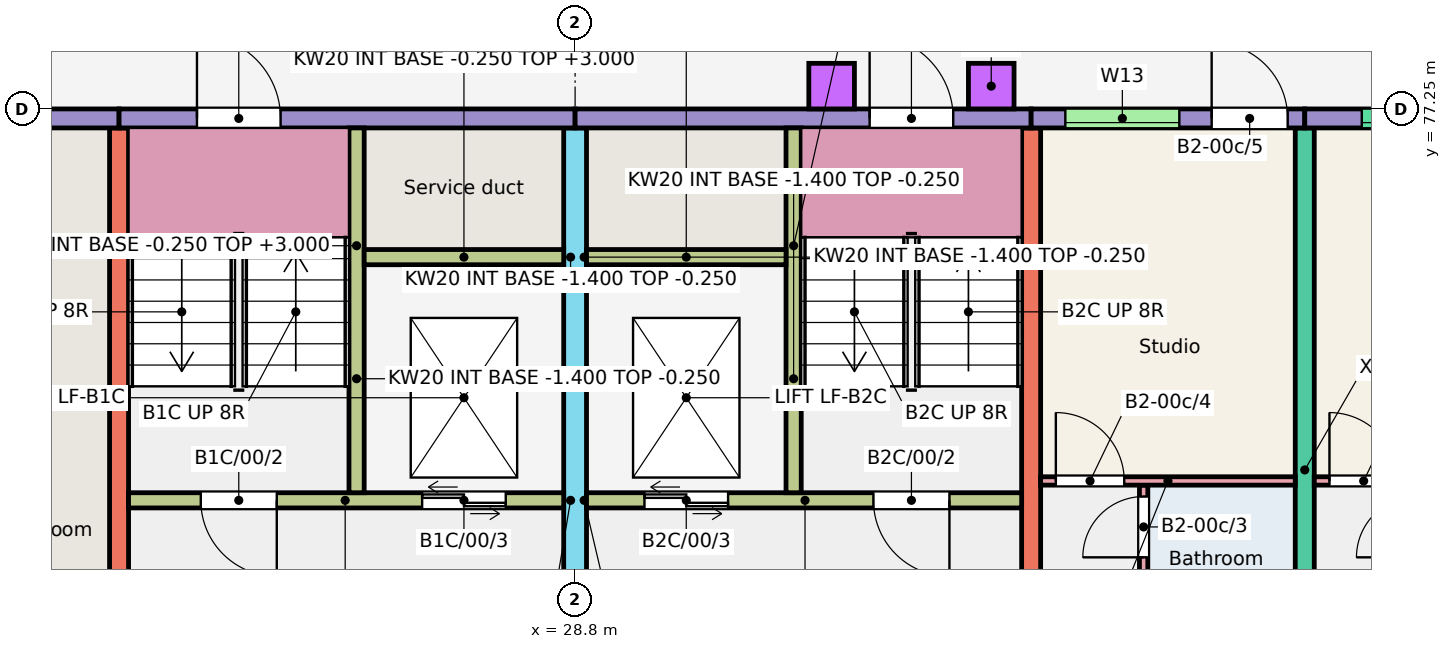
"""IFC4 building model, lengths in metres.
Left out: names, types, materials, properties, quantities, classifications, styles, units other than length and angle.
Written with IfcOpenShell. Run it as: python <this file> out.ifc"""

import sys

from ifc_helpers import new_model, si_unit, direction, frame, frame_2d, origin, origin_2d, place, context, subcontext, project, spatial, rectangle, extrude, element, fill, save


model = new_model("IFC4")
c1 = context("Model", 3, precision=1e-05, world=origin(), true_north=direction((0.0, 1.0)))
c2 = subcontext(c1, "Body", "Model", "MODEL_VIEW")
j1 = project(units=[si_unit("LENGTHUNIT", "METRE"), si_unit("PLANEANGLEUNIT", "RADIAN")], contexts=[c1])
p1 = place(None, origin())
s1 = spatial("IfcSite", under=j1, at=p1, CompositionType="ELEMENT")
p2 = place(p1, origin())
s2 = spatial("IfcBuilding", under=s1, at=p2, CompositionType="ELEMENT")
p3 = place(p2, origin())
s3 = spatial("IfcBuildingStorey", under=s2, at=p3, CompositionType="ELEMENT", Elevation=0.0)
p4 = place(p3, frame((22.8, 68.0, -0.25), z_axis=(0.0, 0.0, 1.0), x_axis=(0.0, 1.0, 0.0)))
e1 = element("IfcWall", 1, at=p4, inside=s3, PredefinedType="SHEAR", context=c2, shape_type="SweptSolid", body=[
    extrude(rectangle(XDim=9.0, YDim=0.25, at=frame_2d((4.5, 0.0))), origin(), (0.0, 0.0, 1.0), 3.25),
])
p5 = place(p3, frame((28.8, 66.0, -0.25), z_axis=(0.0, 0.0, 1.0), x_axis=(0.0, 1.0, 0.0)))
e2 = element("IfcWall", 2, at=p5, inside=s3, PredefinedType="SHEAR", context=c2, shape_type="SweptSolid", body=[
    extrude(rectangle(XDim=11.0, YDim=0.3, at=frame_2d((5.5, 0.0))), origin(), (0.0, 0.0, 1.0), 3.25),
])
p6 = place(p5, frame((0.3, 0.0, 0.25)))
e3 = element("IfcOpeningElement", 3, at=p6, cuts=e2, PredefinedType="OPENING", context=c2, shape_type="SweptSolid", body=[
    extrude(rectangle(XDim=1.2, YDim=2.1, at=frame_2d((0.6, 1.05))), frame((0.0, 0.16, 0.0), z_axis=(0.0, -1.0, 0.0), x_axis=(1.0, 0.0, 0.0)), (0.0, 0.0, 1.0), 0.32),
])
for number, where, z_axis, x_axis in (
    (4, (34.8, 68.0, -0.25), (0.0, 0.0, 1.0), (0.0, 1.0, 0.0)),
    (5, (38.4, 68.0, -0.25), (0.0, 0.0, 1.0), (0.0, 1.0, 0.0)),
):
    element("IfcWall", number, at=place(p3, frame(where, z_axis=z_axis, x_axis=x_axis)), inside=s3, PredefinedType="SHEAR", context=c2, shape_type="SweptSolid", body=[
        extrude(rectangle(XDim=9.0, YDim=0.25, at=frame_2d((4.5, 0.0))), origin(), (0.0, 0.0, 1.0), 3.25),
    ])
p7 = place(p3, frame((19.2, 77.125, -0.25), z_axis=(0.0, 0.0, 1.0), x_axis=(1.0, 0.0, 0.0)))
e6 = element("IfcWall", 6, at=p7, inside=s3, PredefinedType="SOLIDWALL", context=c2, shape_type="SweptSolid", body=[
    extrude(rectangle(XDim=3.6, YDim=0.25, at=frame_2d((1.8, 0.0))), origin(), (0.0, 0.0, 1.0), 3.25),
])
p8 = place(p7, frame((1.288, 0.0, 0.25)))
e7 = element("IfcOpeningElement", 7, at=p8, cuts=e6, PredefinedType="OPENING", context=c2, shape_type="SweptSolid", body=[
    extrude(rectangle(XDim=1.0, YDim=2.1, at=frame_2d((0.5, 1.05))), frame((0.0, 0.135, 0.0), z_axis=(0.0, -1.0, 0.0), x_axis=(1.0, 0.0, 0.0)), (0.0, 0.0, 1.0), 0.27),
])
p9 = place(p3, frame((22.8, 77.125, -0.25), z_axis=(0.0, 0.0, 1.0), x_axis=(1.0, 0.0, 0.0)))
e8 = element("IfcWall", 8, at=p9, inside=s3, PredefinedType="SOLIDWALL", context=c2, shape_type="SweptSolid", body=[
    extrude(rectangle(XDim=6.0, YDim=0.25, at=frame_2d((3.0, 0.0))), origin(), (0.0, 0.0, 1.0), 3.25),
])
p10 = place(p9, frame((1.025, 0.0, 0.25)))
e9 = element("IfcOpeningElement", 9, at=p10, cuts=e8, PredefinedType="OPENING", context=c2, shape_type="SweptSolid", body=[
    extrude(rectangle(XDim=1.1, YDim=2.1, at=frame_2d((0.55, 1.05))), frame((0.0, 0.135, 0.0), z_axis=(0.0, -1.0, 0.0), x_axis=(1.0, 0.0, 0.0)), (0.0, 0.0, 1.0), 0.27),
])
p11 = place(p3, frame((22.925, 72.1, -0.25), z_axis=(0.0, 0.0, 1.0), x_axis=(1.0, 0.0, 0.0)))
e10 = element("IfcWall", 10, at=p11, inside=s3, PredefinedType="SHEAR", context=c2, shape_type="SweptSolid", body=[
    extrude(rectangle(XDim=5.725, YDim=0.2, at=frame_2d((2.862, 0.0))), origin(), (0.0, 0.0, 1.0), 3.25),
])
p12 = place(p11, frame((0.95, 0.0, 0.25)))
e11 = element("IfcOpeningElement", 11, at=p12, cuts=e10, PredefinedType="OPENING", context=c2, shape_type="SweptSolid", body=[
    extrude(rectangle(XDim=1.0, YDim=2.1, at=frame_2d((0.5, 1.05))), frame((0.0, 0.11, 0.0), z_axis=(0.0, -1.0, 0.0), x_axis=(1.0, 0.0, 0.0)), (0.0, 0.0, 1.0), 0.22),
])
p13 = place(p11, frame((3.863, 0.0, 0.25)))
e12 = element("IfcOpeningElement", 12, at=p13, cuts=e10, PredefinedType="OPENING", context=c2, shape_type="SweptSolid", body=[
    extrude(rectangle(XDim=1.1, YDim=2.1, at=frame_2d((0.55, 1.05))), frame((0.0, 0.11, 0.0), z_axis=(0.0, -1.0, 0.0), x_axis=(1.0, 0.0, 0.0)), (0.0, 0.0, 1.0), 0.22),
])
p14 = place(p3, frame((25.925, 72.2, -0.25), z_axis=(0.0, 0.0, 1.0), x_axis=(0.0, 1.0, 0.0)))
e13 = element("IfcWall", 13, at=p14, inside=s3, PredefinedType="SHEAR", context=c2, shape_type="SweptSolid", body=[
    extrude(rectangle(XDim=4.8, YDim=0.2, at=frame_2d((2.4, 0.0))), origin(), (0.0, 0.0, 1.0), 3.25),
])
p15 = place(p3, frame((26.025, 75.3, -0.25), z_axis=(0.0, 0.0, 1.0), x_axis=(1.0, 0.0, 0.0)))
e14 = element("IfcWall", 14, at=p15, inside=s3, PredefinedType="SHEAR", context=c2, shape_type="SweptSolid", body=[
    extrude(rectangle(XDim=2.625, YDim=0.2, at=frame_2d((1.312, 0.0))), origin(), (0.0, 0.0, 1.0), 3.25),
])
p16 = place(p3, frame((28.8, 77.125, -0.25), z_axis=(0.0, 0.0, 1.0), x_axis=(1.0, 0.0, 0.0)))
e15 = element("IfcWall", 15, at=p16, inside=s3, PredefinedType="SOLIDWALL", context=c2, shape_type="SweptSolid", body=[
    extrude(rectangle(XDim=6.0, YDim=0.25, at=frame_2d((3.0, 0.0))), origin(), (0.0, 0.0, 1.0), 3.25),
])
p17 = place(p16, frame((3.875, 0.0, 0.25)))
e16 = element("IfcOpeningElement", 16, at=p17, cuts=e15, PredefinedType="OPENING", context=c2, shape_type="SweptSolid", body=[
    extrude(rectangle(XDim=1.1, YDim=2.1, at=frame_2d((0.55, 1.05))), frame((0.0, 0.135, 0.0), z_axis=(0.0, -1.0, 0.0), x_axis=(1.0, 0.0, 0.0)), (0.0, 0.0, 1.0), 0.27),
])
p18 = place(p3, frame((28.95, 72.1, -0.25), z_axis=(0.0, 0.0, 1.0), x_axis=(1.0, 0.0, 0.0)))
e17 = element("IfcWall", 17, at=p18, inside=s3, PredefinedType="SHEAR", context=c2, shape_type="SweptSolid", body=[
    extrude(rectangle(XDim=5.725, YDim=0.2, at=frame_2d((2.863, 0.0))), origin(), (0.0, 0.0, 1.0), 3.25),
])
p19 = place(p18, frame((3.775, 0.0, 0.25)))
e18 = element("IfcOpeningElement", 18, at=p19, cuts=e17, PredefinedType="OPENING", context=c2, shape_type="SweptSolid", body=[
    extrude(rectangle(XDim=1.0, YDim=2.1, at=frame_2d((0.5, 1.05))), frame((0.0, 0.11, 0.0), z_axis=(0.0, -1.0, 0.0), x_axis=(1.0, 0.0, 0.0)), (0.0, 0.0, 1.0), 0.22),
])
p20 = place(p18, frame((0.762, 0.0, 0.25)))
e19 = element("IfcOpeningElement", 19, at=p20, cuts=e17, PredefinedType="OPENING", context=c2, shape_type="SweptSolid", body=[
    extrude(rectangle(XDim=1.1, YDim=2.1, at=frame_2d((0.55, 1.05))), frame((0.0, 0.11, 0.0), z_axis=(0.0, -1.0, 0.0), x_axis=(1.0, 0.0, 0.0)), (0.0, 0.0, 1.0), 0.22),
])
p21 = place(p3, frame((31.675, 72.2, -0.25), z_axis=(0.0, 0.0, 1.0), x_axis=(0.0, 1.0, 0.0)))
e20 = element("IfcWall", 20, at=p21, inside=s3, PredefinedType="SHEAR", context=c2, shape_type="SweptSolid", body=[
    extrude(rectangle(XDim=4.8, YDim=0.2, at=frame_2d((2.4, 0.0))), origin(), (0.0, 0.0, 1.0), 3.25),
])
p22 = place(p3, frame((28.95, 75.3, -0.25), z_axis=(0.0, 0.0, 1.0), x_axis=(1.0, 0.0, 0.0)))
e21 = element("IfcWall", 21, at=p22, inside=s3, PredefinedType="SHEAR", context=c2, shape_type="SweptSolid", body=[
    extrude(rectangle(XDim=2.625, YDim=0.2, at=frame_2d((1.312, 0.0))), origin(), (0.0, 0.0, 1.0), 3.25),
])
p23 = place(p3, frame((34.8, 77.125, -0.25), z_axis=(0.0, 0.0, 1.0), x_axis=(1.0, 0.0, 0.0)))
e22 = element("IfcWall", 22, at=p23, inside=s3, PredefinedType="SOLIDWALL", context=c2, shape_type="SweptSolid", body=[
    extrude(rectangle(XDim=3.6, YDim=0.25, at=frame_2d((1.8, 0.0))), origin(), (0.0, 0.0, 1.0), 3.25),
])
p24 = place(p23, frame((0.45, 0.0, 1.45)))
e23 = element("IfcOpeningElement", 23, at=p24, cuts=e22, PredefinedType="OPENING", context=c2, shape_type="SweptSolid", body=[
    extrude(rectangle(XDim=1.5, YDim=1.2, at=frame_2d((0.75, 0.6))), frame((0.0, 0.135, 0.0), z_axis=(0.0, -1.0, 0.0), x_axis=(1.0, 0.0, 0.0)), (0.0, 0.0, 1.0), 0.27),
])
p25 = place(p23, frame((2.375, 0.0, 0.25)))
e24 = element("IfcOpeningElement", 24, at=p25, cuts=e22, PredefinedType="OPENING", context=c2, shape_type="SweptSolid", body=[
    extrude(rectangle(XDim=1.0, YDim=2.1, at=frame_2d((0.5, 1.05))), frame((0.0, 0.135, 0.0), z_axis=(0.0, -1.0, 0.0), x_axis=(1.0, 0.0, 0.0)), (0.0, 0.0, 1.0), 0.27),
])
p26 = place(p3, frame((38.4, 77.125, -0.25), z_axis=(0.0, 0.0, 1.0), x_axis=(1.0, 0.0, 0.0)))
e25 = element("IfcWall", 25, at=p26, inside=s3, PredefinedType="SOLIDWALL", context=c2, shape_type="SweptSolid", body=[
    extrude(rectangle(XDim=3.6, YDim=0.25, at=frame_2d((1.8, 0.0))), origin(), (0.0, 0.0, 1.0), 3.25),
])
p27 = place(p26, frame((0.75, 0.0, 1.45)))
e26 = element("IfcOpeningElement", 26, at=p27, cuts=e25, PredefinedType="OPENING", context=c2, shape_type="SweptSolid", body=[
    extrude(rectangle(XDim=2.1, YDim=1.2, at=frame_2d((1.05, 0.6))), frame((0.0, 0.135, 0.0), z_axis=(0.0, -1.0, 0.0), x_axis=(1.0, 0.0, 0.0)), (0.0, 0.0, 1.0), 0.27),
])
for number, where, z_axis, x_axis in (
    (27, (25.825, 72.1, -1.4), (0.0, 0.0, 1.0), (1.0, 0.0, 0.0)),
    (28, (25.825, 75.3, -1.4), (0.0, 0.0, 1.0), (1.0, 0.0, 0.0)),
):
    element("IfcWall", number, at=place(p3, frame(where, z_axis=z_axis, x_axis=x_axis)), inside=s3, PredefinedType="SHEAR", context=c2, shape_type="SweptSolid", body=[
        extrude(rectangle(XDim=2.975, YDim=0.2, at=frame_2d((1.488, 0.0))), origin(), (0.0, 0.0, 1.0), 1.15),
    ])
p28 = place(p3, frame((25.925, 72.2, -1.4), z_axis=(0.0, 0.0, 1.0), x_axis=(0.0, 1.0, 0.0)))
e29 = element("IfcWall", 29, at=p28, inside=s3, PredefinedType="SHEAR", context=c2, shape_type="SweptSolid", body=[
    extrude(rectangle(XDim=3.0, YDim=0.2, at=frame_2d((1.5, 0.0))), origin(), (0.0, 0.0, 1.0), 1.15),
])
p29 = place(p3, frame((28.725, 72.2, -1.4), z_axis=(0.0, 0.0, 1.0), x_axis=(0.0, 1.0, 0.0)))
e30 = element("IfcWall", 30, at=p29, inside=s3, PredefinedType="SHEAR", context=c2, shape_type="SweptSolid", body=[
    extrude(rectangle(XDim=3.0, YDim=0.15, at=frame_2d((1.5, 0.0))), origin(), (0.0, 0.0, 1.0), 1.15),
])
for number, where, z_axis, x_axis in (
    (31, (28.8, 72.1, -1.4), (0.0, 0.0, 1.0), (1.0, 0.0, 0.0)),
    (32, (28.8, 75.3, -1.4), (0.0, 0.0, 1.0), (1.0, 0.0, 0.0)),
):
    element("IfcWall", number, at=place(p3, frame(where, z_axis=z_axis, x_axis=x_axis)), inside=s3, PredefinedType="SHEAR", context=c2, shape_type="SweptSolid", body=[
        extrude(rectangle(XDim=2.975, YDim=0.2, at=frame_2d((1.487, 0.0))), origin(), (0.0, 0.0, 1.0), 1.15),
    ])
p30 = place(p3, frame((31.675, 72.2, -1.4), z_axis=(0.0, 0.0, 1.0), x_axis=(0.0, 1.0, 0.0)))
e33 = element("IfcWall", 33, at=p30, inside=s3, PredefinedType="SHEAR", context=c2, shape_type="SweptSolid", body=[
    extrude(rectangle(XDim=3.0, YDim=0.2, at=frame_2d((1.5, 0.0))), origin(), (0.0, 0.0, 1.0), 1.15),
])
p31 = place(p3, frame((28.875, 72.2, -1.4), z_axis=(0.0, 0.0, 1.0), x_axis=(0.0, 1.0, 0.0)))
e34 = element("IfcWall", 34, at=p31, inside=s3, PredefinedType="SHEAR", context=c2, shape_type="SweptSolid", body=[
    extrude(rectangle(XDim=3.0, YDim=0.15, at=frame_2d((1.5, 0.0))), origin(), (0.0, 0.0, 1.0), 1.15),
])
for number, where, z_axis, x_axis in (
    (35, (32.175, 77.55, -0.25), (0.0, 0.0, 1.0), (1.0, 0.0, 0.0)),
    (36, (34.275, 77.55, -0.25), (0.0, 0.0, 1.0), (1.0, 0.0, 0.0)),
):
    element("IfcColumn", number, at=place(p3, frame(where, z_axis=z_axis, x_axis=x_axis)), inside=s3, PredefinedType="COLUMN", context=c2, shape_type="SweptSolid", body=[
        extrude(rectangle(XDim=0.6, YDim=0.6, at=origin_2d()), origin(), (0.0, 0.0, 1.0), 3.15),
    ])
p32 = place(p3, frame((38.525, 72.355, 0.0), z_axis=(0.0, 0.0, 1.0), x_axis=(1.0, 0.0, 0.0)))
e37 = element("IfcWall", 37, at=p32, inside=s3, PredefinedType="PARTITIONING", context=c2, shape_type="SweptSolid", body=[
    extrude(rectangle(XDim=3.35, YDim=0.11, at=frame_2d((1.675, 0.0))), origin(), (0.0, 0.0, 1.0), 2.8),
])
p33 = place(p32, frame((0.2, 0.0, 0.0)))
e38 = element("IfcOpeningElement", 38, at=p33, cuts=e37, PredefinedType="OPENING", context=c2, shape_type="SweptSolid", body=[
    extrude(rectangle(XDim=0.9, YDim=2.1, at=frame_2d((0.45, 1.05))), frame((0.0, 0.065, 0.0), z_axis=(0.0, -1.0, 0.0), x_axis=(1.0, 0.0, 0.0)), (0.0, 0.0, 1.0), 0.13),
])
p34 = place(p3, frame((36.28, 68.0, 0.0), z_axis=(0.0, 0.0, 1.0), x_axis=(0.0, 1.0, 0.0)))
e39 = element("IfcWall", 39, at=p34, inside=s3, PredefinedType="PARTITIONING", context=c2, shape_type="SweptSolid", body=[
    extrude(rectangle(XDim=4.3, YDim=0.11, at=frame_2d((2.15, 0.0))), origin(), (0.0, 0.0, 1.0), 2.8),
])
p35 = place(p34, frame((0.2, 0.0, 0.0)))
e40 = element("IfcOpeningElement", 40, at=p35, cuts=e39, PredefinedType="OPENING", context=c2, shape_type="SweptSolid", body=[
    extrude(rectangle(XDim=0.8, YDim=2.1, at=frame_2d((0.4, 1.05))), frame((0.0, 0.065, 0.0), z_axis=(0.0, -1.0, 0.0), x_axis=(1.0, 0.0, 0.0)), (0.0, 0.0, 1.0), 0.13),
])
p36 = place(p34, frame((3.35, 0.0, 0.0)))
e41 = element("IfcOpeningElement", 41, at=p36, cuts=e39, PredefinedType="OPENING", context=c2, shape_type="SweptSolid", body=[
    extrude(rectangle(XDim=0.8, YDim=2.1, at=frame_2d((0.4, 1.05))), frame((0.0, 0.065, 0.0), z_axis=(0.0, -1.0, 0.0), x_axis=(1.0, 0.0, 0.0)), (0.0, 0.0, 1.0), 0.13),
])
p37 = place(p3, frame((34.925, 72.355, 0.0), z_axis=(0.0, 0.0, 1.0), x_axis=(1.0, 0.0, 0.0)))
e42 = element("IfcWall", 42, at=p37, inside=s3, PredefinedType="PARTITIONING", context=c2, shape_type="SweptSolid", body=[
    extrude(rectangle(XDim=3.35, YDim=0.11, at=frame_2d((1.675, 0.0))), origin(), (0.0, 0.0, 1.0), 2.8),
])
p38 = place(p37, frame((0.2, 0.0, 0.0)))
e43 = element("IfcOpeningElement", 43, at=p38, cuts=e42, PredefinedType="OPENING", context=c2, shape_type="SweptSolid", body=[
    extrude(rectangle(XDim=0.9, YDim=2.1, at=frame_2d((0.45, 1.05))), frame((0.0, 0.065, 0.0), z_axis=(0.0, -1.0, 0.0), x_axis=(1.0, 0.0, 0.0)), (0.0, 0.0, 1.0), 0.13),
])
p39 = place(p27, origin())
e44 = element("IfcWindow", 44, at=p39, inside=s3, PartitioningType="SINGLE_PANEL", PredefinedType="WINDOW", context=c2, shape_type="SweptSolid", body=[
    extrude(rectangle(XDim=2.1, YDim=1.2, at=frame_2d((1.05, 0.6))), frame((0.0, -0.025, 0.0), z_axis=(0.0, -1.0, 0.0), x_axis=(1.0, 0.0, 0.0)), (0.0, 0.0, 1.0), 0.06),
])
fill(e26, e44)
p40 = place(p24, origin())
e45 = element("IfcWindow", 45, at=p40, inside=s3, PartitioningType="SINGLE_PANEL", PredefinedType="WINDOW", context=c2, shape_type="SweptSolid", body=[
    extrude(rectangle(XDim=1.5, YDim=1.2, at=frame_2d((0.75, 0.6))), frame((0.0, -0.025, 0.0), z_axis=(0.0, -1.0, 0.0), x_axis=(1.0, 0.0, 0.0)), (0.0, 0.0, 1.0), 0.06),
])
fill(e23, e45)
p41 = place(p33, origin())
e46 = element("IfcDoor", 46, at=p41, inside=s3, OperationType="SINGLE_SWING_LEFT", PredefinedType="DOOR", context=c2, shape_type="SweptSolid", body=[
    extrude(rectangle(XDim=0.9, YDim=2.1, at=frame_2d((0.45, 1.05))), frame((0.0, 0.025, 0.0), z_axis=(0.0, -1.0, 0.0), x_axis=(1.0, 0.0, 0.0)), (0.0, 0.0, 1.0), 0.05),
])
fill(e38, e46)
p42 = place(p36, origin())
e47 = element("IfcDoor", 47, at=p42, inside=s3, OperationType="SINGLE_SWING_LEFT", PredefinedType="DOOR", context=c2, shape_type="SweptSolid", body=[
    extrude(rectangle(XDim=0.8, YDim=2.1, at=frame_2d((0.4, 1.05))), frame((0.0, 0.025, 0.0), z_axis=(0.0, -1.0, 0.0), x_axis=(1.0, 0.0, 0.0)), (0.0, 0.0, 1.0), 0.05),
])
fill(e41, e47)
p43 = place(p38, origin())
e48 = element("IfcDoor", 48, at=p43, inside=s3, OperationType="SINGLE_SWING_LEFT", PredefinedType="DOOR", context=c2, shape_type="SweptSolid", body=[
    extrude(rectangle(XDim=0.9, YDim=2.1, at=frame_2d((0.45, 1.05))), frame((0.0, 0.025, 0.0), z_axis=(0.0, -1.0, 0.0), x_axis=(1.0, 0.0, 0.0)), (0.0, 0.0, 1.0), 0.05),
])
fill(e43, e48)
p44 = place(p25, origin())
e49 = element("IfcDoor", 49, at=p44, inside=s3, OperationType="SINGLE_SWING_LEFT", PredefinedType="DOOR", context=c2, shape_type="SweptSolid", body=[
    extrude(rectangle(XDim=1.0, YDim=2.1, at=frame_2d((0.5, 1.05))), frame((0.0, 0.025, 0.0), z_axis=(0.0, -1.0, 0.0), x_axis=(1.0, 0.0, 0.0)), (0.0, 0.0, 1.0), 0.05),
])
fill(e24, e49)
p45 = place(p12, origin())
e50 = element("IfcDoor", 50, at=p45, inside=s3, OperationType="SINGLE_SWING_RIGHT", PredefinedType="DOOR", context=c2, shape_type="SweptSolid", body=[
    extrude(rectangle(XDim=1.0, YDim=2.1, at=frame_2d((0.5, 1.05))), frame((0.0, 0.025, 0.0), z_axis=(0.0, -1.0, 0.0), x_axis=(1.0, 0.0, 0.0)), (0.0, 0.0, 1.0), 0.05),
])
fill(e11, e50)
p46 = place(p13, origin())
e51 = element("IfcDoor", 51, at=p46, inside=s3, OperationType="DOUBLE_DOOR_SLIDING", PredefinedType="DOOR", context=c2, shape_type="SweptSolid", body=[
    extrude(rectangle(XDim=1.1, YDim=2.1, at=frame_2d((0.55, 1.05))), frame((0.0, 0.025, 0.0), z_axis=(0.0, -1.0, 0.0), x_axis=(1.0, 0.0, 0.0)), (0.0, 0.0, 1.0), 0.05),
])
fill(e12, e51)
p47 = place(p10, origin())
e52 = element("IfcDoor", 52, at=p47, inside=s3, OperationType="SINGLE_SWING_LEFT", PredefinedType="DOOR", context=c2, shape_type="SweptSolid", body=[
    extrude(rectangle(XDim=1.1, YDim=2.1, at=frame_2d((0.55, 1.05))), frame((0.0, 0.025, 0.0), z_axis=(0.0, -1.0, 0.0), x_axis=(1.0, 0.0, 0.0)), (0.0, 0.0, 1.0), 0.05),
])
fill(e9, e52)
p48 = place(p19, origin())
e53 = element("IfcDoor", 53, at=p48, inside=s3, OperationType="SINGLE_SWING_RIGHT", PredefinedType="DOOR", context=c2, shape_type="SweptSolid", body=[
    extrude(rectangle(XDim=1.0, YDim=2.1, at=frame_2d((0.5, 1.05))), frame((0.0, 0.025, 0.0), z_axis=(0.0, -1.0, 0.0), x_axis=(1.0, 0.0, 0.0)), (0.0, 0.0, 1.0), 0.05),
])
fill(e18, e53)
p49 = place(p20, origin())
e54 = element("IfcDoor", 54, at=p49, inside=s3, OperationType="DOUBLE_DOOR_SLIDING", PredefinedType="DOOR", context=c2, shape_type="SweptSolid", body=[
    extrude(rectangle(XDim=1.1, YDim=2.1, at=frame_2d((0.55, 1.05))), frame((0.0, 0.025, 0.0), z_axis=(0.0, -1.0, 0.0), x_axis=(1.0, 0.0, 0.0)), (0.0, 0.0, 1.0), 0.05),
])
fill(e19, e54)
p50 = place(p17, origin())
e55 = element("IfcDoor", 55, at=p50, inside=s3, OperationType="SINGLE_SWING_LEFT", PredefinedType="DOOR", context=c2, shape_type="SweptSolid", body=[
    extrude(rectangle(XDim=1.1, YDim=2.1, at=frame_2d((0.55, 1.05))), frame((0.0, 0.025, 0.0), z_axis=(0.0, -1.0, 0.0), x_axis=(1.0, 0.0, 0.0)), (0.0, 0.0, 1.0), 0.05),
])
fill(e16, e55)
save(model, sys.argv[1])
